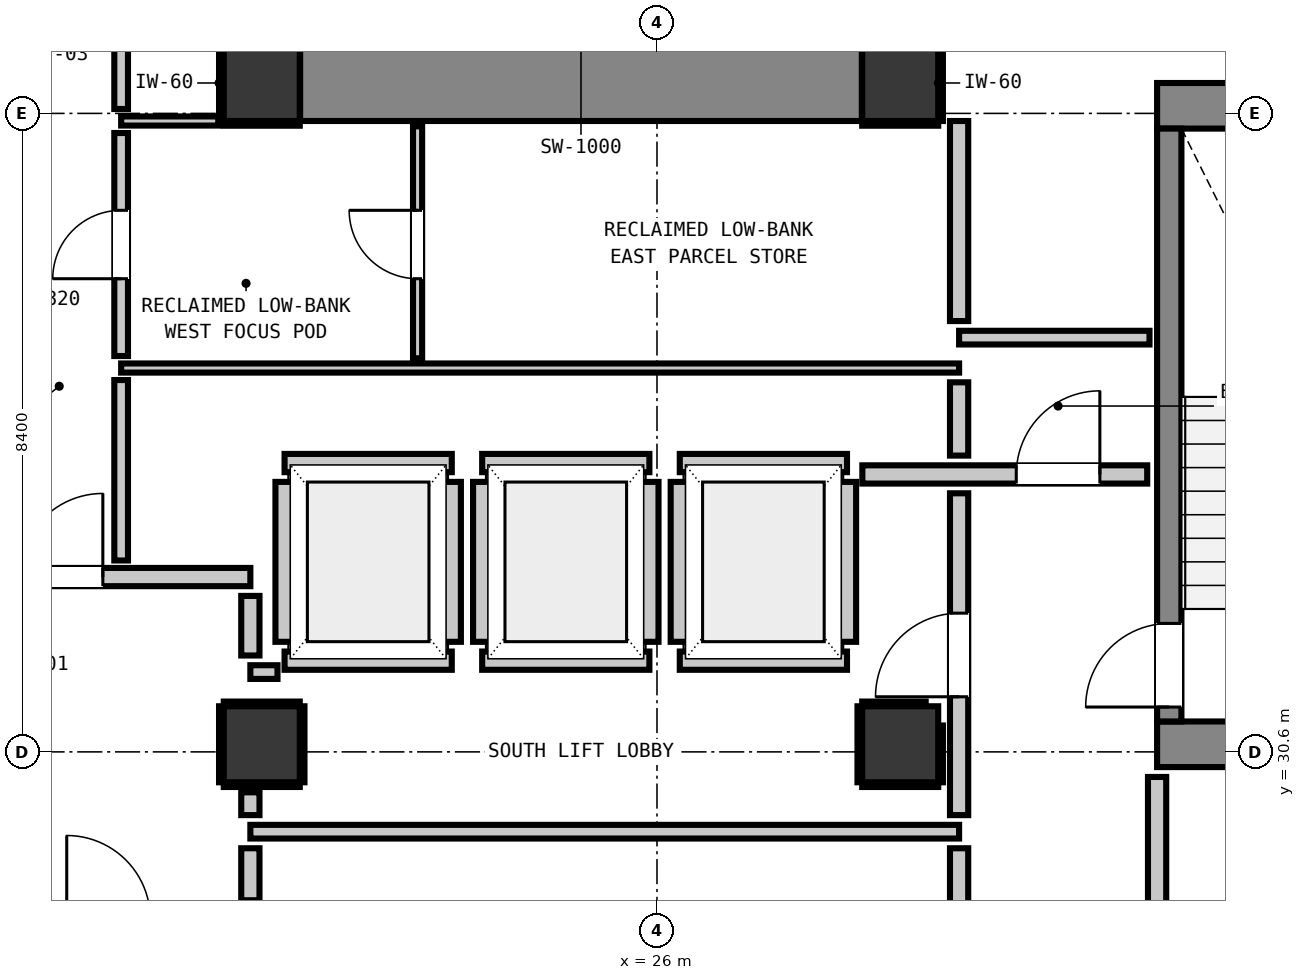
"""IFC4 building model, lengths in metres.
Left out: names, types, materials, properties, quantities, classifications, styles, units other than length and angle.
Written with IfcOpenShell. Run it as: python <this file> out.ifc"""

import sys

from ifc_helpers import new_model, si_unit, direction, frame, frame_2d, origin, origin_2d, place, context, subcontext, project, spatial, rectangle, extrude, element, fill, save


model = new_model("IFC4")
c1 = context("Model", 3, precision=1e-05, world=origin(), true_north=direction((0.0, 1.0)))
c2 = subcontext(c1, "Body", "Model", "MODEL_VIEW")
j1 = project(units=[si_unit("LENGTHUNIT", "METRE"), si_unit("PLANEANGLEUNIT", "RADIAN")], contexts=[c1])
p1 = place(None, origin())
s1 = spatial("IfcSite", under=j1, at=p1, CompositionType="ELEMENT")
p2 = place(p1, origin())
s2 = spatial("IfcBuilding", under=s1, at=p2, CompositionType="ELEMENT")
p3 = place(p2, frame((0.0, 0.0, 165.84)))
s3 = spatial("IfcBuildingStorey", under=s2, at=p3, CompositionType="ELEMENT", Elevation=165.84)
for number, where, z_axis, x_axis in (
    (1, (20.8, 39.4, 0.0), (0.0, 0.0, 1.0), (1.0, 0.0, 0.0)),
    (2, (29.2, 39.4, 0.0), (0.0, 0.0, 1.0), (1.0, 0.0, 0.0)),
):
    element("IfcColumn", number, at=place(p3, frame(where, z_axis=z_axis, x_axis=x_axis)), inside=s3, PredefinedType="COLUMN", context=c2, shape_type="SweptSolid", body=[
        extrude(rectangle(XDim=1.0, YDim=1.0, at=origin_2d()), origin(), (0.0, 0.0, 1.0), 3.32),
    ])
p4 = place(p3, frame((32.58, 39.1, 0.0), z_axis=(0.0, 0.0, 1.0), x_axis=(1.0, 0.0, 0.0)))
e3 = element("IfcWall", 3, at=p4, inside=s3, PredefinedType="SHEAR", context=c2, shape_type="SweptSolid", body=[
    extrude(rectangle(XDim=4.08, YDim=0.6, at=frame_2d((2.04, 0.0))), origin(), (0.0, 0.0, 1.0), 3.32),
])
p5 = place(p3, frame((32.58, 30.7, 0.0), z_axis=(0.0, 0.0, 1.0), x_axis=(1.0, 0.0, 0.0)))
e4 = element("IfcWall", 4, at=p5, inside=s3, PredefinedType="SHEAR", context=c2, shape_type="SweptSolid", body=[
    extrude(rectangle(XDim=3.415, YDim=0.6, at=frame_2d((1.708, 0.0))), origin(), (0.0, 0.0, 1.0), 3.32),
])
p6 = place(p3, frame((21.305, 39.4, 0.0), z_axis=(0.0, 0.0, 1.0), x_axis=(1.0, 0.0, 0.0)))
e5 = element("IfcWall", 5, at=p6, inside=s3, PredefinedType="SHEAR", context=c2, shape_type="SweptSolid", body=[
    extrude(rectangle(XDim=7.39, YDim=1.0, at=frame_2d((3.695, 0.0))), origin(), (0.0, 0.0, 1.0), 3.32),
])
p7 = place(p3, frame((32.74, 31.0, 0.0), z_axis=(0.0, 0.0, 1.0), x_axis=(0.0, 1.0, 0.0)))
e6 = element("IfcWall", 6, at=p7, inside=s3, PredefinedType="SHEAR", context=c2, shape_type="SweptSolid", body=[
    extrude(rectangle(XDim=7.8, YDim=0.32, at=frame_2d((3.9, 0.0))), origin(), (0.0, 0.0, 1.0), 3.32),
])
p8 = place(p7, frame((0.19, 0.0, 0.0)))
e7 = element("IfcOpeningElement", 7, at=p8, cuts=e6, PredefinedType="OPENING", context=c2, shape_type="SweptSolid", body=[
    extrude(rectangle(XDim=1.1, YDim=2.15, at=frame_2d((0.55, 1.075))), frame((0.0, 0.17, 0.0), z_axis=(0.0, -1.0, 0.0), x_axis=(1.0, 0.0, 0.0)), (0.0, 0.0, 1.0), 0.34),
])
for number, where, z_axis, x_axis in (
    (8, (20.8, 30.7, 0.0), (0.0, 0.0, 1.0), (1.0, 0.0, 0.0)),
    (9, (29.2, 30.7, 0.0), (0.0, 0.0, 1.0), (1.0, 0.0, 0.0)),
):
    element("IfcColumn", number, at=place(p3, frame(where, z_axis=z_axis, x_axis=x_axis)), inside=s3, PredefinedType="COLUMN", context=c2, shape_type="SweptSolid", body=[
        extrude(rectangle(XDim=1.0, YDim=1.0, at=origin_2d()), origin(), (0.0, 0.0, 1.0), 3.32),
    ])
for number, where, z_axis, x_axis in (
    (10, (21.1, 31.8, 0.0), (0.0, 0.0, 1.0), (1.0, 0.0, 0.0)),
    (11, (21.1, 34.4, 0.0), (0.0, 0.0, 1.0), (1.0, 0.0, 0.0)),
):
    element("IfcWall", number, at=place(p3, frame(where, z_axis=z_axis, x_axis=x_axis)), inside=s3, PredefinedType="PARTITIONING", context=c2, shape_type="SweptSolid", body=[
        extrude(rectangle(XDim=2.2, YDim=0.24, at=frame_2d((1.1, 0.0))), origin(), (0.0, 0.0, 1.0), 3.08),
    ])
p9 = place(p3, frame((21.1, 32.048, 0.0), z_axis=(0.0, 0.0, 1.0), x_axis=(0.0, 1.0, 0.0)))
e12 = element("IfcWall", 12, at=p9, inside=s3, PredefinedType="PARTITIONING", context=c2, shape_type="SweptSolid", body=[
    extrude(rectangle(XDim=2.104, YDim=0.24, at=frame_2d((1.052, 0.0))), origin(), (0.0, 0.0, 1.0), 2.315),
])
p10 = place(p3, frame((23.3, 32.048, 0.0), z_axis=(0.0, 0.0, 1.0), x_axis=(0.0, 1.0, 0.0)))
e13 = element("IfcWall", 13, at=p10, inside=s3, PredefinedType="PARTITIONING", context=c2, shape_type="SweptSolid", body=[
    extrude(rectangle(XDim=2.104, YDim=0.24, at=frame_2d((1.052, 0.0))), origin(), (0.0, 0.0, 1.0), 3.08),
])
for number, where, z_axis, x_axis in (
    (14, (23.7, 31.8, 0.0), (0.0, 0.0, 1.0), (1.0, 0.0, 0.0)),
    (15, (23.7, 34.4, 0.0), (0.0, 0.0, 1.0), (1.0, 0.0, 0.0)),
):
    element("IfcWall", number, at=place(p3, frame(where, z_axis=z_axis, x_axis=x_axis)), inside=s3, PredefinedType="PARTITIONING", context=c2, shape_type="SweptSolid", body=[
        extrude(rectangle(XDim=2.2, YDim=0.24, at=frame_2d((1.1, 0.0))), origin(), (0.0, 0.0, 1.0), 3.08),
    ])
for number, where, z_axis, x_axis in (
    (16, (23.7, 32.048, 0.0), (0.0, 0.0, 1.0), (0.0, 1.0, 0.0)),
    (17, (25.9, 32.048, 0.0), (0.0, 0.0, 1.0), (0.0, 1.0, 0.0)),
):
    element("IfcWall", number, at=place(p3, frame(where, z_axis=z_axis, x_axis=x_axis)), inside=s3, PredefinedType="PARTITIONING", context=c2, shape_type="SweptSolid", body=[
        extrude(rectangle(XDim=2.104, YDim=0.24, at=frame_2d((1.052, 0.0))), origin(), (0.0, 0.0, 1.0), 3.08),
    ])
for number, where, z_axis, x_axis in (
    (18, (26.3, 31.8, 0.0), (0.0, 0.0, 1.0), (1.0, 0.0, 0.0)),
    (19, (26.3, 34.4, 0.0), (0.0, 0.0, 1.0), (1.0, 0.0, 0.0)),
):
    element("IfcWall", number, at=place(p3, frame(where, z_axis=z_axis, x_axis=x_axis)), inside=s3, PredefinedType="PARTITIONING", context=c2, shape_type="SweptSolid", body=[
        extrude(rectangle(XDim=2.2, YDim=0.24, at=frame_2d((1.1, 0.0))), origin(), (0.0, 0.0, 1.0), 3.08),
    ])
for number, where, z_axis, x_axis in (
    (20, (26.3, 32.048, 0.0), (0.0, 0.0, 1.0), (0.0, 1.0, 0.0)),
    (21, (28.5, 32.048, 0.0), (0.0, 0.0, 1.0), (0.0, 1.0, 0.0)),
):
    element("IfcWall", number, at=place(p3, frame(where, z_axis=z_axis, x_axis=x_axis)), inside=s3, PredefinedType="PARTITIONING", context=c2, shape_type="SweptSolid", body=[
        extrude(rectangle(XDim=2.104, YDim=0.24, at=frame_2d((1.052, 0.0))), origin(), (0.0, 0.0, 1.0), 3.08),
    ])
p11 = place(p3, frame((17.45, 32.9, 0.0), z_axis=(0.0, 0.0, 1.0), x_axis=(1.0, 0.0, 0.0)))
e22 = element("IfcWall", 22, at=p11, inside=s3, PredefinedType="PARTITIONING", context=c2, shape_type="SweptSolid", body=[
    extrude(rectangle(XDim=3.2, YDim=0.24, at=frame_2d((1.6, 0.0))), origin(), (0.0, 0.0, 1.0), 3.08),
])
p12 = place(p11, frame((0.159, 0.0, 0.0)))
e23 = element("IfcOpeningElement", 23, at=p12, cuts=e22, PredefinedType="OPENING", context=c2, shape_type="SweptSolid", body=[
    extrude(rectangle(XDim=1.1, YDim=2.15, at=frame_2d((0.55, 1.075))), frame((0.0, 0.13, 0.0), z_axis=(0.0, -1.0, 0.0), x_axis=(1.0, 0.0, 0.0)), (0.0, 0.0, 1.0), 0.26),
])
p13 = place(p3, frame((28.702, 34.25, 0.0), z_axis=(0.0, 0.0, 1.0), x_axis=(1.0, 0.0, 0.0)))
e24 = element("IfcWall", 24, at=p13, inside=s3, PredefinedType="PARTITIONING", context=c2, shape_type="SweptSolid", body=[
    extrude(rectangle(XDim=3.748, YDim=0.24, at=frame_2d((1.874, 0.0))), origin(), (0.0, 0.0, 1.0), 3.08),
])
p14 = place(p13, frame((2.025, 0.0, 0.0)))
e25 = element("IfcOpeningElement", 25, at=p14, cuts=e24, PredefinedType="OPENING", context=c2, shape_type="SweptSolid", body=[
    extrude(rectangle(XDim=1.1, YDim=2.15, at=frame_2d((0.55, 1.075))), frame((0.0, 0.13, 0.0), z_axis=(0.0, -1.0, 0.0), x_axis=(1.0, 0.0, 0.0)), (0.0, 0.0, 1.0), 0.26),
])
p15 = place(p3, frame((20.65, 29.55, 0.0), z_axis=(0.0, 0.0, 1.0), x_axis=(1.0, 0.0, 0.0)))
e26 = element("IfcWall", 26, at=p15, inside=s3, PredefinedType="PARTITIONING", context=c2, shape_type="SweptSolid", body=[
    extrude(rectangle(XDim=9.325, YDim=0.18, at=frame_2d((4.663, 0.0))), origin(), (0.0, 0.0, 1.0), 3.08),
])
p16 = place(p3, frame((20.65, 31.65, 0.0), z_axis=(0.0, 0.0, 1.0), x_axis=(1.0, 0.0, 0.0)))
e27 = element("IfcWall", 27, at=p16, inside=s3, PredefinedType="PARTITIONING", context=c2, shape_type="SweptSolid", body=[
    extrude(rectangle(XDim=0.357, YDim=0.18, at=frame_2d((0.179, 0.0))), origin(), (0.0, 0.0, 1.0), 3.08),
])
p17 = place(p3, frame((29.975, 36.05, 0.0), z_axis=(0.0, 0.0, 1.0), x_axis=(1.0, 0.0, 0.0)))
e28 = element("IfcWall", 28, at=p17, inside=s3, PredefinedType="PARTITIONING", context=c2, shape_type="SweptSolid", body=[
    extrude(rectangle(XDim=2.505, YDim=0.18, at=frame_2d((1.252, 0.0))), origin(), (0.0, 0.0, 1.0), 3.08),
])
p18 = place(p3, frame((18.95, 35.65, 0.0), z_axis=(0.0, 0.0, 1.0), x_axis=(1.0, 0.0, 0.0)))
e29 = element("IfcWall", 29, at=p18, inside=s3, PredefinedType="PARTITIONING", context=c2, shape_type="SweptSolid", body=[
    extrude(rectangle(XDim=11.025, YDim=0.12, at=frame_2d((5.513, 0.0))), origin(), (0.0, 0.0, 1.0), 3.08),
])
p19 = place(p3, frame((18.95, 38.9, 0.0), z_axis=(0.0, 0.0, 1.0), x_axis=(1.0, 0.0, 0.0)))
e30 = element("IfcWall", 30, at=p19, inside=s3, PredefinedType="PARTITIONING", context=c2, shape_type="SweptSolid", body=[
    extrude(rectangle(XDim=1.278, YDim=0.12, at=frame_2d((0.639, 0.0))), origin(), (0.0, 0.0, 1.0), 3.08),
])
p20 = place(p3, frame((20.65, 28.648, 0.0), z_axis=(0.0, 0.0, 1.0), x_axis=(0.0, 1.0, 0.0)))
e31 = element("IfcWall", 31, at=p20, inside=s3, PredefinedType="PARTITIONING", context=c2, shape_type="SweptSolid", body=[
    extrude(rectangle(XDim=0.684, YDim=0.24, at=frame_2d((0.342, 0.0))), origin(), (0.0, 0.0, 1.0), 2.315),
])
p21 = place(p3, frame((20.65, 29.768, 0.0), z_axis=(0.0, 0.0, 1.0), x_axis=(0.0, 1.0, 0.0)))
e32 = element("IfcWall", 32, at=p21, inside=s3, PredefinedType="PARTITIONING", context=c2, shape_type="SweptSolid", body=[
    extrude(rectangle(XDim=0.3, YDim=0.24, at=frame_2d((0.15, 0.0))), origin(), (0.0, 0.0, 1.0), 2.315),
])
p22 = place(p3, frame((20.65, 31.868, 0.0), z_axis=(0.0, 0.0, 1.0), x_axis=(0.0, 1.0, 0.0)))
e33 = element("IfcWall", 33, at=p22, inside=s3, PredefinedType="PARTITIONING", context=c2, shape_type="SweptSolid", body=[
    extrude(rectangle(XDim=0.784, YDim=0.24, at=frame_2d((0.392, 0.0))), origin(), (0.0, 0.0, 1.0), 2.315),
])
p23 = place(p3, frame((29.975, 25.648, 0.0), z_axis=(0.0, 0.0, 1.0), x_axis=(0.0, 1.0, 0.0)))
e34 = element("IfcWall", 34, at=p23, inside=s3, PredefinedType="PARTITIONING", context=c2, shape_type="SweptSolid", body=[
    extrude(rectangle(XDim=3.684, YDim=0.24, at=frame_2d((1.842, 0.0))), origin(), (0.0, 0.0, 1.0), 3.08),
])
p24 = place(p3, frame((29.975, 29.768, 0.0), z_axis=(0.0, 0.0, 1.0), x_axis=(0.0, 1.0, 0.0)))
e35 = element("IfcWall", 35, at=p24, inside=s3, PredefinedType="PARTITIONING", context=c2, shape_type="SweptSolid", body=[
    extrude(rectangle(XDim=4.234, YDim=0.24, at=frame_2d((2.117, 0.0))), origin(), (0.0, 0.0, 1.0), 3.08),
])
p25 = place(p24, frame((1.557, 0.0, 0.0)))
e36 = element("IfcOpeningElement", 36, at=p25, cuts=e35, PredefinedType="OPENING", context=c2, shape_type="SweptSolid", body=[
    extrude(rectangle(XDim=1.1, YDim=2.15, at=frame_2d((0.55, 1.075))), frame((0.0, 0.13, 0.0), z_axis=(0.0, -1.0, 0.0), x_axis=(1.0, 0.0, 0.0)), (0.0, 0.0, 1.0), 0.26),
])
p26 = place(p3, frame((29.975, 34.498, 0.0), z_axis=(0.0, 0.0, 1.0), x_axis=(0.0, 1.0, 0.0)))
e37 = element("IfcWall", 37, at=p26, inside=s3, PredefinedType="PARTITIONING", context=c2, shape_type="SweptSolid", body=[
    extrude(rectangle(XDim=0.964, YDim=0.24, at=frame_2d((0.482, 0.0))), origin(), (0.0, 0.0, 1.0), 3.08),
])
p27 = place(p3, frame((29.975, 36.268, 0.0), z_axis=(0.0, 0.0, 1.0), x_axis=(0.0, 1.0, 0.0)))
e38 = element("IfcWall", 38, at=p27, inside=s3, PredefinedType="PARTITIONING", context=c2, shape_type="SweptSolid", body=[
    extrude(rectangle(XDim=2.632, YDim=0.24, at=frame_2d((1.316, 0.0))), origin(), (0.0, 0.0, 1.0), 3.08),
])
p28 = place(p3, frame((32.58, 25.648, 0.0), z_axis=(0.0, 0.0, 1.0), x_axis=(0.0, 1.0, 0.0)))
e39 = element("IfcWall", 39, at=p28, inside=s3, PredefinedType="PARTITIONING", context=c2, shape_type="SweptSolid", body=[
    extrude(rectangle(XDim=4.622, YDim=0.24, at=frame_2d((2.311, 0.0))), origin(), (0.0, 0.0, 1.0), 3.08),
])
p29 = place(p3, frame((18.95, 33.118, 0.0), z_axis=(0.0, 0.0, 1.0), x_axis=(0.0, 1.0, 0.0)))
e40 = element("IfcWall", 40, at=p29, inside=s3, PredefinedType="PARTITIONING", context=c2, shape_type="SweptSolid", body=[
    extrude(rectangle(XDim=2.374, YDim=0.18, at=frame_2d((1.187, 0.0))), origin(), (0.0, 0.0, 1.0), 3.08),
])
p30 = place(p3, frame((18.95, 35.808, 0.0), z_axis=(0.0, 0.0, 1.0), x_axis=(0.0, 1.0, 0.0)))
e41 = element("IfcWall", 41, at=p30, inside=s3, PredefinedType="PARTITIONING", context=c2, shape_type="SweptSolid", body=[
    extrude(rectangle(XDim=2.934, YDim=0.18, at=frame_2d((1.467, 0.0))), origin(), (0.0, 0.0, 1.0), 3.08),
])
p31 = place(p30, frame((1.017, 0.0, 0.0)))
e42 = element("IfcOpeningElement", 42, at=p31, cuts=e41, PredefinedType="OPENING", context=c2, shape_type="SweptSolid", body=[
    extrude(rectangle(XDim=0.9, YDim=2.1, at=frame_2d((0.45, 1.05))), frame((0.0, 0.1, 0.0), z_axis=(0.0, -1.0, 0.0), x_axis=(1.0, 0.0, 0.0)), (0.0, 0.0, 1.0), 0.2),
])
p32 = place(p3, frame((18.95, 39.058, 0.0), z_axis=(0.0, 0.0, 1.0), x_axis=(0.0, 1.0, 0.0)))
e43 = element("IfcWall", 43, at=p32, inside=s3, PredefinedType="PARTITIONING", context=c2, shape_type="SweptSolid", body=[
    extrude(rectangle(XDim=1.004, YDim=0.18, at=frame_2d((0.502, 0.0))), origin(), (0.0, 0.0, 1.0), 3.08),
])
p33 = place(p3, frame((22.85, 35.778, 0.0), z_axis=(0.0, 0.0, 1.0), x_axis=(0.0, 1.0, 0.0)))
e44 = element("IfcWall", 44, at=p33, inside=s3, PredefinedType="PARTITIONING", context=c2, shape_type="SweptSolid", body=[
    extrude(rectangle(XDim=3.052, YDim=0.12, at=frame_2d((1.526, 0.0))), origin(), (0.0, 0.0, 1.0), 3.08),
])
p34 = place(p33, frame((1.047, 0.0, 0.0)))
e45 = element("IfcOpeningElement", 45, at=p34, cuts=e44, PredefinedType="OPENING", context=c2, shape_type="SweptSolid", body=[
    extrude(rectangle(XDim=0.9, YDim=2.1, at=frame_2d((0.45, 1.05))), frame((0.0, 0.07, 0.0), z_axis=(0.0, -1.0, 0.0), x_axis=(1.0, 0.0, 0.0)), (0.0, 0.0, 1.0), 0.14),
])
for number, where, z_axis, x_axis in (
    (46, (20.3, 38.868, 0.0), (0.0, 0.0, 1.0), (1.0, 0.0, 0.0)),
    (47, (20.268, 38.9, 0.0), (0.0, 0.0, 1.0), (0.0, 1.0, 0.0)),
    (48, (28.7, 38.868, 0.0), (0.0, 0.0, 1.0), (1.0, 0.0, 0.0)),
    (49, (29.732, 38.9, 0.0), (0.0, 0.0, 1.0), (0.0, 1.0, 0.0)),
    (50, (20.3, 30.168, 0.0), (0.0, 0.0, 1.0), (1.0, 0.0, 0.0)),
    (51, (20.3, 31.232, 0.0), (0.0, 0.0, 1.0), (1.0, 0.0, 0.0)),
    (52, (20.268, 30.2, 0.0), (0.0, 0.0, 1.0), (0.0, 1.0, 0.0)),
    (53, (21.332, 30.2, 0.0), (0.0, 0.0, 1.0), (0.0, 1.0, 0.0)),
    (54, (28.7, 30.168, 0.0), (0.0, 0.0, 1.0), (1.0, 0.0, 0.0)),
):
    element("IfcWall", number, at=place(p3, frame(where, z_axis=z_axis, x_axis=x_axis)), inside=s3, PredefinedType="PARTITIONING", context=c2, shape_type="SweptSolid", body=[
        extrude(rectangle(XDim=1.0, YDim=0.06, at=frame_2d((0.5, 0.0))), origin(), (0.0, 0.0, 1.0), 1.45),
    ])
p35 = place(p3, frame((28.7, 31.232, 0.0), z_axis=(0.0, 0.0, 1.0), x_axis=(1.0, 0.0, 0.0)))
e55 = element("IfcWall", 55, at=p35, inside=s3, PredefinedType="PARTITIONING", context=c2, shape_type="SweptSolid", body=[
    extrude(rectangle(XDim=0.835, YDim=0.06, at=frame_2d((0.417, 0.0))), origin(), (0.0, 0.0, 1.0), 1.45),
])
p36 = place(p3, frame((28.668, 30.2, 0.0), z_axis=(0.0, 0.0, 1.0), x_axis=(0.0, 1.0, 0.0)))
e56 = element("IfcWall", 56, at=p36, inside=s3, PredefinedType="PARTITIONING", context=c2, shape_type="SweptSolid", body=[
    extrude(rectangle(XDim=1.0, YDim=0.06, at=frame_2d((0.5, 0.0))), origin(), (0.0, 0.0, 1.0), 1.45),
])
p37 = place(p3, frame((29.732, 30.2, 0.0), z_axis=(0.0, 0.0, 1.0), x_axis=(0.0, 1.0, 0.0)))
e57 = element("IfcWall", 57, at=p37, inside=s3, PredefinedType="PARTITIONING", context=c2, shape_type="SweptSolid", body=[
    extrude(rectangle(XDim=0.747, YDim=0.06, at=frame_2d((0.374, 0.0))), origin(), (0.0, 0.0, 1.0), 1.45),
])
p38 = place(p8, origin())
e58 = element("IfcDoor", 58, at=p38, inside=s3, OperationType="SINGLE_SWING_LEFT", PredefinedType="DOOR", context=c2, shape_type="SweptSolid", body=[
    extrude(rectangle(XDim=1.1, YDim=2.15, at=frame_2d((0.55, 1.075))), frame((0.0, 0.025, 0.0), z_axis=(0.0, -1.0, 0.0), x_axis=(1.0, 0.0, 0.0)), (0.0, 0.0, 1.0), 0.05),
])
fill(e7, e58)
p39 = place(p12, origin())
e59 = element("IfcDoor", 59, at=p39, inside=s3, OperationType="SINGLE_SWING_RIGHT", PredefinedType="DOOR", context=c2, shape_type="SweptSolid", body=[
    extrude(rectangle(XDim=1.1, YDim=2.15, at=frame_2d((0.55, 1.075))), frame((0.0, 0.025, 0.0), z_axis=(0.0, -1.0, 0.0), x_axis=(1.0, 0.0, 0.0)), (0.0, 0.0, 1.0), 0.05),
])
fill(e23, e59)
p40 = place(p25, origin())
e60 = element("IfcDoor", 60, at=p40, inside=s3, OperationType="SINGLE_SWING_LEFT", PredefinedType="DOOR", context=c2, shape_type="SweptSolid", body=[
    extrude(rectangle(XDim=1.1, YDim=2.15, at=frame_2d((0.55, 1.075))), frame((0.0, 0.025, 0.0), z_axis=(0.0, -1.0, 0.0), x_axis=(1.0, 0.0, 0.0)), (0.0, 0.0, 1.0), 0.05),
])
fill(e36, e60)
p41 = place(p14, origin())
e61 = element("IfcDoor", 61, at=p41, inside=s3, OperationType="SINGLE_SWING_RIGHT", PredefinedType="DOOR", context=c2, shape_type="SweptSolid", body=[
    extrude(rectangle(XDim=1.1, YDim=2.15, at=frame_2d((0.55, 1.075))), frame((0.0, 0.025, 0.0), z_axis=(0.0, -1.0, 0.0), x_axis=(1.0, 0.0, 0.0)), (0.0, 0.0, 1.0), 0.05),
])
fill(e25, e61)
p42 = place(p31, origin())
e62 = element("IfcDoor", 62, at=p42, inside=s3, OperationType="SINGLE_SWING_LEFT", PredefinedType="DOOR", context=c2, shape_type="SweptSolid", body=[
    extrude(rectangle(XDim=0.9, YDim=2.1, at=frame_2d((0.45, 1.05))), frame((0.0, 0.025, 0.0), z_axis=(0.0, -1.0, 0.0), x_axis=(1.0, 0.0, 0.0)), (0.0, 0.0, 1.0), 0.05),
])
fill(e42, e62)
p43 = place(p34, origin())
e63 = element("IfcDoor", 63, at=p43, inside=s3, OperationType="SINGLE_SWING_RIGHT", PredefinedType="DOOR", context=c2, shape_type="SweptSolid", body=[
    extrude(rectangle(XDim=0.9, YDim=2.1, at=frame_2d((0.45, 1.05))), frame((0.0, 0.025, 0.0), z_axis=(0.0, -1.0, 0.0), x_axis=(1.0, 0.0, 0.0)), (0.0, 0.0, 1.0), 0.05),
])
fill(e45, e63)
save(model, sys.argv[1])
